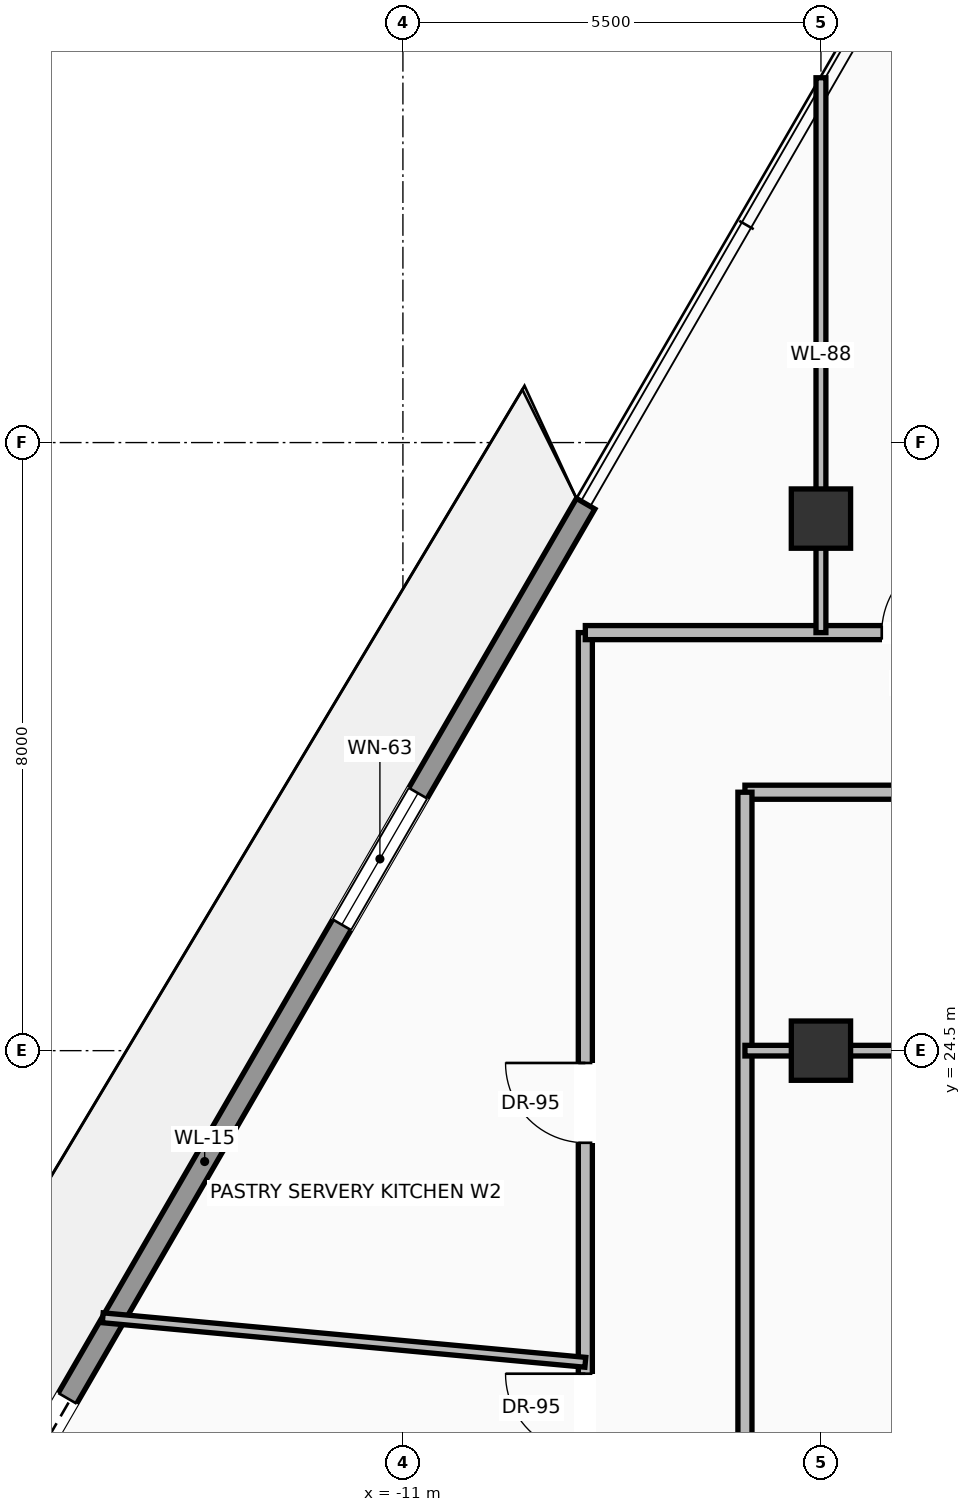
"""IFC4 building model, lengths in metres.
Left out: names, types, materials, properties, quantities, classifications, styles, units other than length and angle.
Written with IfcOpenShell. Run it as: python <this file> out.ifc"""

import sys

from ifc_helpers import new_model, si_unit, direction, frame, frame_2d, origin, origin_2d, place, context, subcontext, project, spatial, rectangle, extrude, source, transform, mapped, element, fill, save


model = new_model("IFC4")
c1 = context("Model", 3, precision=1e-05, world=origin(), true_north=direction((0.0, 1.0)))
c2 = subcontext(c1, "Body", "Model", "MODEL_VIEW")
j1 = project(units=[si_unit("LENGTHUNIT", "METRE"), si_unit("PLANEANGLEUNIT", "RADIAN")], contexts=[c1])
p1 = place(None, origin())
s1 = spatial("IfcSite", under=j1, at=p1, CompositionType="ELEMENT")
p2 = place(p1, origin())
s2 = spatial("IfcBuilding", under=s1, at=p2, CompositionType="ELEMENT")
p3 = place(p2, frame((0.0, 0.0, 269.55)))
s3 = spatial("IfcBuildingStorey", under=s2, at=p3, CompositionType="ELEMENT", Elevation=269.55)
m1 = source(origin(), c2, "Body", "SweptSolid", [
    extrude(rectangle(XDim=0.78, YDim=0.78, at=origin_2d()), origin(), (0.0, 0.0, 1.0), 3.45),
])
for number, where, z_axis, x_axis in (
    (1, (-5.5, 24.5, 0.0), (0.0, 0.0, 1.0), (1.0, 0.0, 0.0)),
    (2, (-5.5, 31.5, 0.0), (0.0, 0.0, 1.0), (1.0, 0.0, 0.0)),
):
    element("IfcColumn", number, at=place(p3, frame(where, z_axis=z_axis, x_axis=x_axis)), inside=s3, PredefinedType="COLUMN", context=c2, shape_type="MappedRepresentation", body=[
        mapped(m1, transform((0.0, 0.0, 0.0), scale=1.0)),
    ])
p4 = place(p3, frame((-18.621, 14.387, 0.0), z_axis=(0.0, 0.0, 1.0), x_axis=(0.501208020252, 0.865326828681, 0.0)))
e3 = element("IfcWall", 3, at=p4, inside=s3, PredefinedType="SOLIDWALL", context=c2, shape_type="SweptSolid", body=[
    extrude(rectangle(XDim=20.003, YDim=0.28, at=frame_2d((10.001, 0.0))), origin(), (0.0, 0.0, 1.0), 2.82),
])
p5 = place(p4, frame((4.801, 0.0, 0.0)))
e4 = element("IfcOpeningElement", 4, at=p5, cuts=e3, PredefinedType="OPENING", context=c2, shape_type="SweptSolid", body=[
    extrude(rectangle(XDim=1.6, YDim=2.35, at=frame_2d((0.8, 1.175))), frame((0.0, 0.15, 0.0), z_axis=(0.0, -1.0, 0.0), x_axis=(1.0, 0.0, 0.0)), (0.0, 0.0, 1.0), 0.3),
])
p6 = place(p4, frame((13.602, 0.0, 0.9)))
e5 = element("IfcOpeningElement", 5, at=p6, cuts=e3, PredefinedType="OPENING", context=c2, shape_type="SweptSolid", body=[
    extrude(rectangle(XDim=2.0, YDim=1.75, at=frame_2d((1.0, 0.875))), frame((0.0, 0.15, 0.0), z_axis=(0.0, -1.0, 0.0), x_axis=(1.0, 0.0, 0.0)), (0.0, 0.0, 1.0), 0.3),
])
p7 = place(p3, frame((-6.5, 27.9, 0.0), z_axis=(0.0, 0.0, 1.0), x_axis=(1.0, 0.0, 0.0)))
e6 = element("IfcWall", 6, at=p7, inside=s3, PredefinedType="PARTITIONING", context=c2, shape_type="SweptSolid", body=[
    extrude(rectangle(XDim=12.45, YDim=0.185, at=frame_2d((6.225, 0.0))), origin(), (0.0, 0.0, 1.0), 2.885),
])
p8 = place(p7, frame((5.75, 0.0, 0.0)))
e7 = element("IfcOpeningElement", 7, at=p8, cuts=e6, PredefinedType="OPENING", context=c2, shape_type="SweptSolid", body=[
    extrude(rectangle(XDim=0.95, YDim=2.2, at=frame_2d((0.475, 1.1))), frame((0.0, 0.103, 0.0), z_axis=(0.0, -1.0, 0.0), x_axis=(1.0, 0.0, 0.0)), (0.0, 0.0, 1.0), 0.205),
])
p9 = place(p3, frame((-6.5, 18.4, 0.0), z_axis=(0.0, 0.0, 1.0), x_axis=(0.0, 1.0, 0.0)))
e8 = element("IfcWall", 8, at=p9, inside=s3, PredefinedType="PARTITIONING", context=c2, shape_type="SweptSolid", body=[
    extrude(rectangle(XDim=9.5, YDim=0.185, at=frame_2d((4.75, 0.0))), origin(), (0.0, 0.0, 1.0), 3.232),
])
p10 = place(p3, frame((-8.6, 16.2, 0.0), z_axis=(0.0, 0.0, 1.0), x_axis=(0.0, 1.0, 0.0)))
e9 = element("IfcWall", 9, at=p10, inside=s3, PredefinedType="PARTITIONING", context=c2, shape_type="SweptSolid", body=[
    extrude(rectangle(XDim=13.8, YDim=0.185, at=frame_2d((6.9, 0.0))), origin(), (0.0, 0.0, 1.0), 3.232),
])
p11 = place(p10, frame((3.0, 0.0, 0.0)))
e10 = element("IfcOpeningElement", 10, at=p11, cuts=e9, PredefinedType="OPENING", context=c2, shape_type="SweptSolid", body=[
    extrude(rectangle(XDim=1.05, YDim=2.25, at=frame_2d((0.525, 1.125))), frame((0.0, 0.103, 0.0), z_axis=(0.0, -1.0, 0.0), x_axis=(1.0, 0.0, 0.0)), (0.0, 0.0, 1.0), 0.205),
])
p12 = place(p10, frame((7.088, 0.0, 0.0)))
e11 = element("IfcOpeningElement", 11, at=p12, cuts=e9, PredefinedType="OPENING", context=c2, shape_type="SweptSolid", body=[
    extrude(rectangle(XDim=1.05, YDim=2.25, at=frame_2d((0.525, 1.125))), frame((0.0, 0.103, 0.0), z_axis=(0.0, -1.0, 0.0), x_axis=(1.0, 0.0, 0.0)), (0.0, 0.0, 1.0), 0.205),
])
p13 = place(p3, frame((-8.6, 30.0, 0.0), z_axis=(0.0, 0.0, 1.0), x_axis=(1.0, 0.0, 0.0)))
e12 = element("IfcWall", 12, at=p13, inside=s3, PredefinedType="PARTITIONING", context=c2, shape_type="SweptSolid", body=[
    extrude(rectangle(XDim=16.65, YDim=0.185, at=frame_2d((8.325, 0.0))), origin(), (0.0, 0.0, 1.0), 3.232),
])
p14 = place(p13, frame((3.9, 0.0, 0.0)))
e13 = element("IfcOpeningElement", 13, at=p14, cuts=e12, PredefinedType="OPENING", context=c2, shape_type="SweptSolid", body=[
    extrude(rectangle(XDim=1.05, YDim=2.25, at=frame_2d((0.525, 1.125))), frame((0.0, 0.103, 0.0), z_axis=(0.0, -1.0, 0.0), x_axis=(1.0, 0.0, 0.0)), (0.0, 0.0, 1.0), 0.205),
])
p15 = place(p13, frame((7.8, 0.0, 0.0)))
e14 = element("IfcOpeningElement", 14, at=p15, cuts=e12, PredefinedType="OPENING", context=c2, shape_type="SweptSolid", body=[
    extrude(rectangle(XDim=1.05, YDim=2.25, at=frame_2d((0.525, 1.125))), frame((0.0, 0.103, 0.0), z_axis=(0.0, -1.0, 0.0), x_axis=(1.0, 0.0, 0.0)), (0.0, 0.0, 1.0), 0.205),
])
p16 = place(p13, frame((12.25, 0.0, 0.0)))
e15 = element("IfcOpeningElement", 15, at=p16, cuts=e12, PredefinedType="OPENING", context=c2, shape_type="SweptSolid", body=[
    extrude(rectangle(XDim=1.05, YDim=2.25, at=frame_2d((0.525, 1.125))), frame((0.0, 0.103, 0.0), z_axis=(0.0, -1.0, 0.0), x_axis=(1.0, 0.0, 0.0)), (0.0, 0.0, 1.0), 0.205),
])
p17 = place(p3, frame((-6.5, 24.5, 0.0), z_axis=(0.0, 0.0, 1.0), x_axis=(1.0, 0.0, 0.0)))
e16 = element("IfcWall", 16, at=p17, inside=s3, PredefinedType="PARTITIONING", context=c2, shape_type="SweptSolid", body=[
    extrude(rectangle(XDim=12.45, YDim=0.14, at=frame_2d((6.225, 0.0))), origin(), (0.0, 0.0, 1.0), 2.683),
])
p18 = place(p3, frame((-5.5, 30.0, 0.0), z_axis=(0.0, 0.0, 1.0), x_axis=(0.0, 1.0, 0.0)))
e17 = element("IfcWall", 17, at=p18, inside=s3, PredefinedType="PARTITIONING", context=c2, shape_type="SweptSolid", body=[
    extrude(rectangle(XDim=7.3, YDim=0.13, at=frame_2d((3.65, 0.0))), origin(), (0.0, 0.0, 1.0), 2.683),
])
p19 = place(p3, frame((-14.949, 20.986, 0.0), z_axis=(0.0, 0.0, 1.0), x_axis=(0.995772122892, -0.091857929817, 0.0)))
e18 = element("IfcWall", 18, at=p19, inside=s3, PredefinedType="PARTITIONING", context=c2, shape_type="SweptSolid", body=[
    extrude(rectangle(XDim=6.376, YDim=0.13, at=frame_2d((3.188, 0.0))), origin(), (0.0, 0.0, 1.0), 3.232),
])
m2 = source(origin(), c2, "Body", "SweptSolid", [
    extrude(rectangle(XDim=1.6, YDim=2.35, at=frame_2d((0.8, 1.175))), frame((0.0, 0.025, 0.0), z_axis=(0.0, -1.0, 0.0), x_axis=(1.0, 0.0, 0.0)), (0.0, 0.0, 1.0), 0.05),
])
p20 = place(p5, origin())
e19 = element("IfcDoor", 19, at=p20, inside=s3, OperationType="SLIDING_TO_LEFT", PredefinedType="DOOR", context=c2, shape_type="MappedRepresentation", body=[
    mapped(m2, transform((0.0, 0.0, 0.0), scale=1.0)),
])
fill(e4, e19)
m3 = source(origin(), c2, "Body", "SweptSolid", [
    extrude(rectangle(XDim=2.0, YDim=1.75, at=frame_2d((1.0, 0.875))), frame((0.0, 0.03, 0.0), z_axis=(0.0, -1.0, 0.0), x_axis=(1.0, 0.0, 0.0)), (0.0, 0.0, 1.0), 0.06),
])
p21 = place(p6, origin())
e20 = element("IfcWindow", 20, at=p21, inside=s3, PartitioningType="SINGLE_PANEL", PredefinedType="WINDOW", context=c2, shape_type="MappedRepresentation", body=[
    mapped(m3, transform((0.0, 0.0, 0.0), scale=1.0)),
])
fill(e5, e20)
m4 = source(origin(), c2, "Body", "SweptSolid", [
    extrude(rectangle(XDim=1.05, YDim=2.25, at=frame_2d((0.525, 1.125))), frame((0.0, 0.025, 0.0), z_axis=(0.0, -1.0, 0.0), x_axis=(1.0, 0.0, 0.0)), (0.0, 0.0, 1.0), 0.05),
])
p22 = place(p11, origin())
e21 = element("IfcDoor", 21, at=p22, inside=s3, OperationType="SINGLE_SWING_RIGHT", PredefinedType="DOOR", context=c2, shape_type="MappedRepresentation", body=[
    mapped(m4, transform((0.0, 0.0, 0.0), scale=1.0)),
])
fill(e10, e21)
p23 = place(p12, origin())
e22 = element("IfcDoor", 22, at=p23, inside=s3, OperationType="SINGLE_SWING_RIGHT", PredefinedType="DOOR", context=c2, shape_type="MappedRepresentation", body=[
    mapped(m4, transform((0.0, 0.0, 0.0), scale=1.0)),
])
fill(e11, e22)
p24 = place(p14, origin())
e23 = element("IfcDoor", 23, at=p24, inside=s3, OperationType="SINGLE_SWING_RIGHT", PredefinedType="DOOR", context=c2, shape_type="MappedRepresentation", body=[
    mapped(m4, transform((0.0, 0.0, 0.0), scale=1.0)),
])
fill(e13, e23)
save(model, sys.argv[1])
